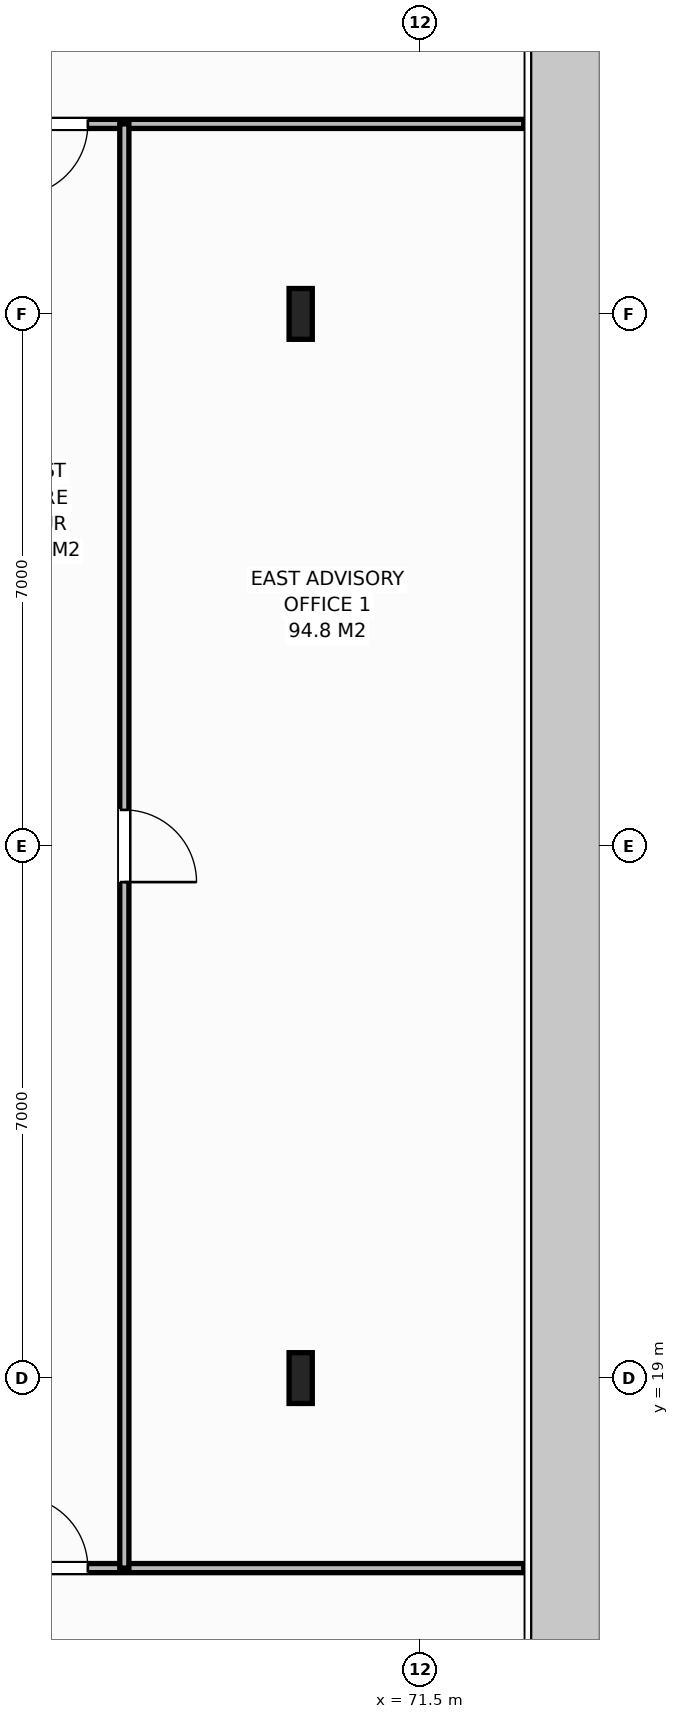
"""IFC4 building model, lengths in metres.
Left out: names, types, materials, properties, quantities, classifications, styles, units other than length and angle.
Written with IfcOpenShell. Run it as: python <this file> out.ifc"""

import sys

from ifc_helpers import new_model, si_unit, direction, frame, frame_2d, origin, origin_2d, place, context, subcontext, project, spatial, rectangle, i_section, extrude, element, fill, save


model = new_model("IFC4")
c1 = context("Model", 3, precision=1e-05, world=origin(), true_north=direction((0.0, 1.0)))
c2 = subcontext(c1, "Body", "Model", "MODEL_VIEW")
j1 = project(units=[si_unit("LENGTHUNIT", "METRE"), si_unit("PLANEANGLEUNIT", "RADIAN")], contexts=[c1])
p1 = place(None, origin())
s1 = spatial("IfcSite", under=j1, at=p1, CompositionType="ELEMENT")
p2 = place(p1, origin())
s2 = spatial("IfcBuilding", under=s1, at=p2, CompositionType="ELEMENT")
p3 = place(p2, frame((0.0, 0.0, 286.4)))
s3 = spatial("IfcBuildingStorey", under=s2, at=p3, CompositionType="ELEMENT", Elevation=286.4)
for number, where, z_axis, x_axis in (
    (1, (69.92, 19.0, 0.0), (0.0, 0.0, 1.0), (1.0, 0.0, 0.0)),
    (2, (69.92, 33.0, 0.0), (0.0, 0.0, 1.0), (1.0, 0.0, 0.0)),
):
    element("IfcColumn", number, at=place(p3, frame(where, z_axis=z_axis, x_axis=x_axis)), inside=s3, PredefinedType="COLUMN", context=c2, shape_type="SweptSolid", body=[
        extrude(i_section(OverallWidth=0.305, OverallDepth=0.668, WebThickness=0.021, FlangeThickness=0.04, at=origin_2d()), origin(), (0.0, 0.0, 1.0), 4.0),
    ])
p4 = place(p3, frame((64.86, 35.5, 0.0), z_axis=(0.0, 0.0, 1.0), x_axis=(1.0, 0.0, 0.0)))
e3 = element("IfcWall", 3, at=p4, inside=s3, PredefinedType="PARTITIONING", context=c2, shape_type="SweptSolid", body=[
    extrude(rectangle(XDim=7.995, YDim=0.12, at=frame_2d((3.998, 0.0))), origin(), (0.0, 0.0, 1.0), 3.788),
])
p5 = place(p4, frame((1.31, 0.0, 0.0)))
e4 = element("IfcOpeningElement", 4, at=p5, cuts=e3, PredefinedType="OPENING", context=c2, shape_type="SweptSolid", body=[
    extrude(rectangle(XDim=0.95, YDim=2.15, at=frame_2d((0.475, 1.075))), frame((0.0, 0.07, 0.0), z_axis=(0.0, -1.0, 0.0), x_axis=(1.0, 0.0, 0.0)), (0.0, 0.0, 1.0), 0.14),
])
p6 = place(p3, frame((63.801, 16.5, 0.0), z_axis=(0.0, 0.0, 1.0), x_axis=(1.0, 0.0, 0.0)))
e5 = element("IfcWall", 5, at=p6, inside=s3, PredefinedType="PARTITIONING", context=c2, shape_type="SweptSolid", body=[
    extrude(rectangle(XDim=9.054, YDim=0.12, at=frame_2d((4.527, 0.0))), origin(), (0.0, 0.0, 1.0), 3.788),
])
p7 = place(p6, frame((2.369, 0.0, 0.0)))
e6 = element("IfcOpeningElement", 6, at=p7, cuts=e5, PredefinedType="OPENING", context=c2, shape_type="SweptSolid", body=[
    extrude(rectangle(XDim=0.95, YDim=2.15, at=frame_2d((0.475, 1.075))), frame((0.0, 0.07, 0.0), z_axis=(0.0, -1.0, 0.0), x_axis=(1.0, 0.0, 0.0)), (0.0, 0.0, 1.0), 0.14),
])
p8 = place(p3, frame((67.6, 16.5, 0.0), z_axis=(0.0, 0.0, 1.0), x_axis=(0.0, 1.0, 0.0)))
e7 = element("IfcWall", 7, at=p8, inside=s3, PredefinedType="PARTITIONING", context=c2, shape_type="SweptSolid", body=[
    extrude(rectangle(XDim=19.0, YDim=0.12, at=frame_2d((9.5, 0.0))), origin(), (0.0, 0.0, 1.0), 3.788),
])
p9 = place(p8, frame((9.025, 0.0, 0.0)))
e8 = element("IfcOpeningElement", 8, at=p9, cuts=e7, PredefinedType="OPENING", context=c2, shape_type="SweptSolid", body=[
    extrude(rectangle(XDim=0.95, YDim=2.15, at=frame_2d((0.475, 1.075))), frame((0.0, 0.07, 0.0), z_axis=(0.0, -1.0, 0.0), x_axis=(1.0, 0.0, 0.0)), (0.0, 0.0, 1.0), 0.14),
])
p10 = place(p5, origin())
e9 = element("IfcDoor", 9, at=p10, inside=s3, OperationType="SINGLE_SWING_RIGHT", PredefinedType="DOOR", context=c2, shape_type="SweptSolid", body=[
    extrude(rectangle(XDim=0.95, YDim=2.15, at=frame_2d((0.475, 1.075))), frame((0.0, 0.025, 0.0), z_axis=(0.0, -1.0, 0.0), x_axis=(1.0, 0.0, 0.0)), (0.0, 0.0, 1.0), 0.05),
])
fill(e4, e9)
p11 = place(p7, origin())
e10 = element("IfcDoor", 10, at=p11, inside=s3, OperationType="SINGLE_SWING_LEFT", PredefinedType="DOOR", context=c2, shape_type="SweptSolid", body=[
    extrude(rectangle(XDim=0.95, YDim=2.15, at=frame_2d((0.475, 1.075))), frame((0.0, 0.025, 0.0), z_axis=(0.0, -1.0, 0.0), x_axis=(1.0, 0.0, 0.0)), (0.0, 0.0, 1.0), 0.05),
])
fill(e6, e10)
p12 = place(p9, origin())
e11 = element("IfcDoor", 11, at=p12, inside=s3, OperationType="SINGLE_SWING_RIGHT", PredefinedType="DOOR", context=c2, shape_type="SweptSolid", body=[
    extrude(rectangle(XDim=0.95, YDim=2.15, at=frame_2d((0.475, 1.075))), frame((0.0, 0.025, 0.0), z_axis=(0.0, -1.0, 0.0), x_axis=(1.0, 0.0, 0.0)), (0.0, 0.0, 1.0), 0.05),
])
fill(e8, e11)
save(model, sys.argv[1])
